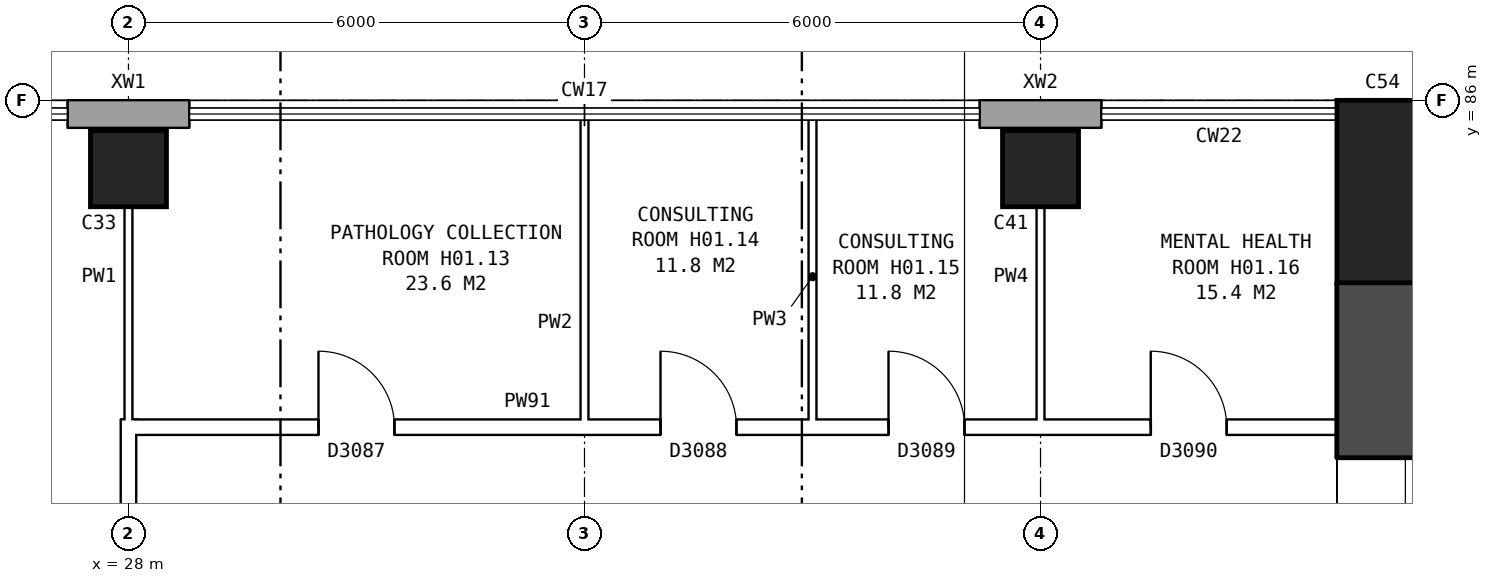
"""IFC4 building model, lengths in metres.
Left out: names, types, materials, properties, quantities, classifications, styles, units other than length and angle.
Written with IfcOpenShell. Run it as: python <this file> out.ifc"""

import sys

from ifc_helpers import new_model, si_unit, direction, frame, frame_2d, origin, origin_2d, place, context, subcontext, project, spatial, rectangle, extrude, element, fill, save


model = new_model("IFC4")
c1 = context("Model", 3, precision=1e-05, world=origin(), true_north=direction((0.0, 1.0)))
c2 = subcontext(c1, "Body", "Model", "MODEL_VIEW")
j1 = project(units=[si_unit("LENGTHUNIT", "METRE"), si_unit("PLANEANGLEUNIT", "RADIAN")], contexts=[c1])
p1 = place(None, origin())
s1 = spatial("IfcSite", under=j1, at=p1, CompositionType="ELEMENT")
p2 = place(p1, origin())
s2 = spatial("IfcBuilding", under=s1, at=p2, CompositionType="ELEMENT")
p3 = place(p2, frame((0.0, 0.0, 5.5)))
s3 = spatial("IfcBuildingStorey", under=s2, at=p3, CompositionType="ELEMENT", Elevation=5.5)
p4 = place(p3, frame((44.5, 84.8, -0.3), z_axis=(0.0, 0.0, 1.0), x_axis=(1.0, 0.0, 0.0)))
e1 = element("IfcColumn", 1, at=p4, inside=s3, PredefinedType="COLUMN", context=c2, shape_type="SweptSolid", body=[
    extrude(rectangle(XDim=1.2, YDim=2.4, at=origin_2d()), origin(), (0.0, 0.0, 1.0), 4.6),
])
p5 = place(p3, frame((44.5, 56.4, -0.3), z_axis=(0.0, 0.0, 1.0), x_axis=(0.0, 1.0, 0.0)))
e2 = element("IfcWall", 2, at=p5, inside=s3, PredefinedType="SHEAR", context=c2, shape_type="SweptSolid", body=[
    extrude(rectangle(XDim=27.2, YDim=1.2, at=frame_2d((13.6, 0.0))), origin(), (0.0, 0.0, 1.0), 4.6),
])
p6 = place(p5, frame((2.3, 0.0, 0.8)))
e3 = element("IfcOpeningElement", 3, at=p6, cuts=e2, PredefinedType="OPENING", context=c2, shape_type="SweptSolid", body=[
    extrude(rectangle(XDim=1.6, YDim=1.8, at=frame_2d((0.8, 0.9))), frame((0.0, 0.61, 0.0), z_axis=(0.0, -1.0, 0.0), x_axis=(1.0, 0.0, 0.0)), (0.0, 0.0, 1.0), 1.22),
])
p7 = place(p5, frame((5.3, 0.0, 0.8)))
e4 = element("IfcOpeningElement", 4, at=p7, cuts=e2, PredefinedType="OPENING", context=c2, shape_type="SweptSolid", body=[
    extrude(rectangle(XDim=1.6, YDim=1.8, at=frame_2d((0.8, 0.9))), frame((0.0, 0.61, 0.0), z_axis=(0.0, -1.0, 0.0), x_axis=(1.0, 0.0, 0.0)), (0.0, 0.0, 1.0), 1.22),
])
p8 = place(p5, frame((8.3, 0.0, 0.8)))
e5 = element("IfcOpeningElement", 5, at=p8, cuts=e2, PredefinedType="OPENING", context=c2, shape_type="SweptSolid", body=[
    extrude(rectangle(XDim=1.6, YDim=1.8, at=frame_2d((0.8, 0.9))), frame((0.0, 0.61, 0.0), z_axis=(0.0, -1.0, 0.0), x_axis=(1.0, 0.0, 0.0)), (0.0, 0.0, 1.0), 1.22),
])
p9 = place(p5, frame((11.3, 0.0, 0.8)))
e6 = element("IfcOpeningElement", 6, at=p9, cuts=e2, PredefinedType="OPENING", context=c2, shape_type="SweptSolid", body=[
    extrude(rectangle(XDim=1.6, YDim=1.8, at=frame_2d((0.8, 0.9))), frame((0.0, 0.61, 0.0), z_axis=(0.0, -1.0, 0.0), x_axis=(1.0, 0.0, 0.0)), (0.0, 0.0, 1.0), 1.22),
])
p10 = place(p5, frame((14.3, 0.0, 0.8)))
e7 = element("IfcOpeningElement", 7, at=p10, cuts=e2, PredefinedType="OPENING", context=c2, shape_type="SweptSolid", body=[
    extrude(rectangle(XDim=1.6, YDim=1.8, at=frame_2d((0.8, 0.9))), frame((0.0, 0.61, 0.0), z_axis=(0.0, -1.0, 0.0), x_axis=(1.0, 0.0, 0.0)), (0.0, 0.0, 1.0), 1.22),
])
p11 = place(p5, frame((17.3, 0.0, 0.8)))
e8 = element("IfcOpeningElement", 8, at=p11, cuts=e2, PredefinedType="OPENING", context=c2, shape_type="SweptSolid", body=[
    extrude(rectangle(XDim=1.6, YDim=1.8, at=frame_2d((0.8, 0.9))), frame((0.0, 0.61, 0.0), z_axis=(0.0, -1.0, 0.0), x_axis=(1.0, 0.0, 0.0)), (0.0, 0.0, 1.0), 1.22),
])
p12 = place(p5, frame((20.3, 0.0, 0.8)))
e9 = element("IfcOpeningElement", 9, at=p12, cuts=e2, PredefinedType="OPENING", context=c2, shape_type="SweptSolid", body=[
    extrude(rectangle(XDim=1.6, YDim=1.8, at=frame_2d((0.8, 0.9))), frame((0.0, 0.61, 0.0), z_axis=(0.0, -1.0, 0.0), x_axis=(1.0, 0.0, 0.0)), (0.0, 0.0, 1.0), 1.22),
])
p13 = place(p5, frame((23.3, 0.0, 0.8)))
e10 = element("IfcOpeningElement", 10, at=p13, cuts=e2, PredefinedType="OPENING", context=c2, shape_type="SweptSolid", body=[
    extrude(rectangle(XDim=1.6, YDim=1.8, at=frame_2d((0.8, 0.9))), frame((0.0, 0.61, 0.0), z_axis=(0.0, -1.0, 0.0), x_axis=(1.0, 0.0, 0.0)), (0.0, 0.0, 1.0), 1.22),
])
for number, where, z_axis, x_axis in (
    (11, (28.0, 85.1, 0.0), (0.0, 0.0, 1.0), (1.0, 0.0, 0.0)),
    (12, (40.0, 85.1, 0.0), (0.0, 0.0, 1.0), (1.0, 0.0, 0.0)),
):
    element("IfcColumn", number, at=place(p3, frame(where, z_axis=z_axis, x_axis=x_axis)), inside=s3, PredefinedType="COLUMN", context=c2, shape_type="SweptSolid", body=[
        extrude(rectangle(XDim=1.0, YDim=1.0, at=origin_2d()), origin(), (0.0, 0.0, 1.0), 4.3),
    ])
for number, where, z_axis, x_axis in (
    (13, (40.8, 85.82, 0.0), (0.0, 0.0, 1.0), (-1.0, 0.0, 0.0)),
    (14, (28.8, 85.82, 0.0), (0.0, 0.0, 1.0), (-1.0, 0.0, 0.0)),
):
    element("IfcWall", number, at=place(p3, frame(where, z_axis=z_axis, x_axis=x_axis)), inside=s3, PredefinedType="STANDARD", context=c2, shape_type="SweptSolid", body=[
        extrude(rectangle(XDim=1.6, YDim=0.36, at=frame_2d((0.8, 0.0))), origin(), (0.0, 0.0, 1.0), 4.3),
    ])
p14 = place(p3, frame((27.9, 81.7, 0.0), z_axis=(0.0, 0.0, 1.0), x_axis=(1.0, 0.0, 0.0)))
e15 = element("IfcWall", 15, at=p14, inside=s3, PredefinedType="PARTITIONING", context=c2, shape_type="SweptSolid", body=[
    extrude(rectangle(XDim=16.12, YDim=0.2, at=frame_2d((8.06, 0.0))), origin(), (0.0, 0.0, 1.0), 4.3),
])
p15 = place(p14, frame((2.6, 0.0, 0.0)))
e16 = element("IfcOpeningElement", 16, at=p15, cuts=e15, PredefinedType="OPENING", context=c2, shape_type="SweptSolid", body=[
    extrude(rectangle(XDim=1.0, YDim=2.1, at=frame_2d((0.5, 1.05))), frame((0.0, 0.11, 0.0), z_axis=(0.0, -1.0, 0.0), x_axis=(1.0, 0.0, 0.0)), (0.0, 0.0, 1.0), 0.22),
])
p16 = place(p14, frame((7.1, 0.0, 0.0)))
e17 = element("IfcOpeningElement", 17, at=p16, cuts=e15, PredefinedType="OPENING", context=c2, shape_type="SweptSolid", body=[
    extrude(rectangle(XDim=1.0, YDim=2.1, at=frame_2d((0.5, 1.05))), frame((0.0, 0.11, 0.0), z_axis=(0.0, -1.0, 0.0), x_axis=(1.0, 0.0, 0.0)), (0.0, 0.0, 1.0), 0.22),
])
p17 = place(p14, frame((10.1, 0.0, 0.0)))
e18 = element("IfcOpeningElement", 18, at=p17, cuts=e15, PredefinedType="OPENING", context=c2, shape_type="SweptSolid", body=[
    extrude(rectangle(XDim=1.0, YDim=2.1, at=frame_2d((0.5, 1.05))), frame((0.0, 0.11, 0.0), z_axis=(0.0, -1.0, 0.0), x_axis=(1.0, 0.0, 0.0)), (0.0, 0.0, 1.0), 0.22),
])
p18 = place(p14, frame((13.55, 0.0, 0.0)))
e19 = element("IfcOpeningElement", 19, at=p18, cuts=e15, PredefinedType="OPENING", context=c2, shape_type="SweptSolid", body=[
    extrude(rectangle(XDim=1.0, YDim=2.1, at=frame_2d((0.5, 1.05))), frame((0.0, 0.11, 0.0), z_axis=(0.0, -1.0, 0.0), x_axis=(1.0, 0.0, 0.0)), (0.0, 0.0, 1.0), 0.22),
])
p19 = place(p3, frame((28.0, 58.198, 0.0), z_axis=(0.0, 0.0, 1.0), x_axis=(0.0, 1.0, 0.0)))
e20 = element("IfcWall", 20, at=p19, inside=s3, PredefinedType="PARTITIONING", context=c2, shape_type="SweptSolid", body=[
    extrude(rectangle(XDim=23.604, YDim=0.2, at=frame_2d((11.802, 0.0))), origin(), (0.0, 0.0, 1.0), 4.3),
])
p20 = place(p19, frame((3.602, 0.0, 0.0)))
e21 = element("IfcOpeningElement", 21, at=p20, cuts=e20, PredefinedType="OPENING", context=c2, shape_type="SweptSolid", body=[
    extrude(rectangle(XDim=1.2, YDim=2.1, at=frame_2d((0.6, 1.05))), frame((0.0, 0.11, 0.0), z_axis=(0.0, -1.0, 0.0), x_axis=(1.0, 0.0, 0.0)), (0.0, 0.0, 1.0), 0.22),
])
p21 = place(p19, frame((8.202, 0.0, 0.0)))
e22 = element("IfcOpeningElement", 22, at=p21, cuts=e20, PredefinedType="OPENING", context=c2, shape_type="SweptSolid", body=[
    extrude(rectangle(XDim=1.2, YDim=2.1, at=frame_2d((0.6, 1.05))), frame((0.0, 0.11, 0.0), z_axis=(0.0, -1.0, 0.0), x_axis=(1.0, 0.0, 0.0)), (0.0, 0.0, 1.0), 0.22),
])
p22 = place(p19, frame((14.302, 0.0, 0.0)))
e23 = element("IfcOpeningElement", 23, at=p22, cuts=e20, PredefinedType="OPENING", context=c2, shape_type="SweptSolid", body=[
    extrude(rectangle(XDim=1.0, YDim=2.1, at=frame_2d((0.5, 1.05))), frame((0.0, 0.11, 0.0), z_axis=(0.0, -1.0, 0.0), x_axis=(1.0, 0.0, 0.0)), (0.0, 0.0, 1.0), 0.22),
])
p23 = place(p19, frame((18.902, 0.0, 0.0)))
e24 = element("IfcOpeningElement", 24, at=p23, cuts=e20, PredefinedType="OPENING", context=c2, shape_type="SweptSolid", body=[
    extrude(rectangle(XDim=1.0, YDim=2.1, at=frame_2d((0.5, 1.05))), frame((0.0, 0.11, 0.0), z_axis=(0.0, -1.0, 0.0), x_axis=(1.0, 0.0, 0.0)), (0.0, 0.0, 1.0), 0.22),
])
p24 = place(p3, frame((28.0, 81.598, 0.0), z_axis=(0.0, 0.0, 1.0), x_axis=(0.0, 1.0, 0.0)))
e25 = element("IfcWall", 25, at=p24, inside=s3, PredefinedType="PARTITIONING", context=c2, shape_type="SweptSolid", body=[
    extrude(rectangle(XDim=4.162, YDim=0.1, at=frame_2d((2.081, 0.0))), origin(), (0.0, 0.0, 1.0), 4.3),
])
for number, where, z_axis, x_axis in (
    (26, (34.0, 81.6, 0.0), (0.0, 0.0, 1.0), (0.0, 1.0, 0.0)),
    (27, (37.0, 81.6, 0.0), (0.0, 0.0, 1.0), (0.0, 1.0, 0.0)),
    (28, (40.0, 81.6, 0.0), (0.0, 0.0, 1.0), (0.0, 1.0, 0.0)),
):
    element("IfcWall", number, at=place(p3, frame(where, z_axis=z_axis, x_axis=x_axis)), inside=s3, PredefinedType="PARTITIONING", context=c2, shape_type="SweptSolid", body=[
        extrude(rectangle(XDim=4.16, YDim=0.1, at=frame_2d((2.08, 0.0))), origin(), (0.0, 0.0, 1.0), 4.3),
    ])
p25 = place(p13, origin())
e29 = element("IfcWindow", 29, at=p25, inside=s3, PartitioningType="SINGLE_PANEL", PredefinedType="WINDOW", context=c2, shape_type="SweptSolid", body=[
    extrude(rectangle(XDim=1.6, YDim=1.8, at=frame_2d((0.8, 0.9))), frame((0.0, -0.27, 0.0), z_axis=(0.0, -1.0, 0.0), x_axis=(1.0, 0.0, 0.0)), (0.0, 0.0, 1.0), 0.06),
])
fill(e10, e29)
p26 = place(p15, origin())
e30 = element("IfcDoor", 30, at=p26, inside=s3, OperationType="SINGLE_SWING_LEFT", PredefinedType="DOOR", context=c2, shape_type="SweptSolid", body=[
    extrude(rectangle(XDim=1.0, YDim=2.1, at=frame_2d((0.5, 1.05))), frame((0.0, 0.025, 0.0), z_axis=(0.0, -1.0, 0.0), x_axis=(1.0, 0.0, 0.0)), (0.0, 0.0, 1.0), 0.05),
])
fill(e16, e30)
p27 = place(p16, origin())
e31 = element("IfcDoor", 31, at=p27, inside=s3, OperationType="SINGLE_SWING_LEFT", PredefinedType="DOOR", context=c2, shape_type="SweptSolid", body=[
    extrude(rectangle(XDim=1.0, YDim=2.1, at=frame_2d((0.5, 1.05))), frame((0.0, 0.025, 0.0), z_axis=(0.0, -1.0, 0.0), x_axis=(1.0, 0.0, 0.0)), (0.0, 0.0, 1.0), 0.05),
])
fill(e17, e31)
p28 = place(p17, origin())
e32 = element("IfcDoor", 32, at=p28, inside=s3, OperationType="SINGLE_SWING_LEFT", PredefinedType="DOOR", context=c2, shape_type="SweptSolid", body=[
    extrude(rectangle(XDim=1.0, YDim=2.1, at=frame_2d((0.5, 1.05))), frame((0.0, 0.025, 0.0), z_axis=(0.0, -1.0, 0.0), x_axis=(1.0, 0.0, 0.0)), (0.0, 0.0, 1.0), 0.05),
])
fill(e18, e32)
p29 = place(p18, origin())
e33 = element("IfcDoor", 33, at=p29, inside=s3, OperationType="SINGLE_SWING_LEFT", PredefinedType="DOOR", context=c2, shape_type="SweptSolid", body=[
    extrude(rectangle(XDim=1.0, YDim=2.1, at=frame_2d((0.5, 1.05))), frame((0.0, 0.025, 0.0), z_axis=(0.0, -1.0, 0.0), x_axis=(1.0, 0.0, 0.0)), (0.0, 0.0, 1.0), 0.05),
])
fill(e19, e33)
save(model, sys.argv[1])
